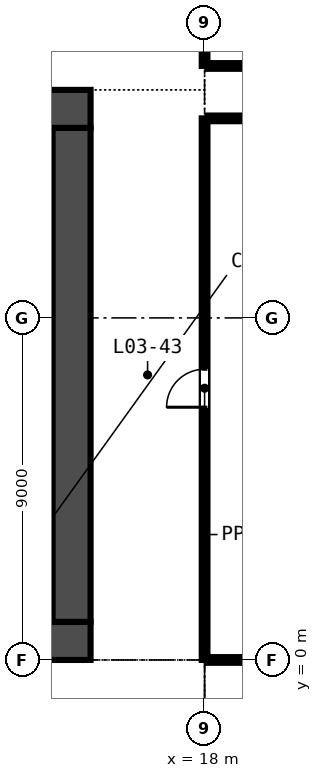
"""IFC4 building model, lengths in metres.
Left out: names, types, materials, properties, quantities, classifications, styles, units other than length and angle.
Written with IfcOpenShell. Run it as: python <this file> out.ifc"""

import sys

from ifc_helpers import new_model, si_unit, direction, frame, frame_2d, origin, place, context, subcontext, project, spatial, rectangle, extrude, element, fill, save


model = new_model("IFC4")
c1 = context("Model", 3, precision=1e-05, world=origin(), true_north=direction((0.0, 1.0)))
c2 = subcontext(c1, "Body", "Model", "MODEL_VIEW")
j1 = project(units=[si_unit("LENGTHUNIT", "METRE"), si_unit("PLANEANGLEUNIT", "RADIAN")], contexts=[c1])
p1 = place(None, origin())
s1 = spatial("IfcSite", under=j1, at=p1, CompositionType="ELEMENT")
p2 = place(p1, origin())
s2 = spatial("IfcBuilding", under=s1, at=p2, CompositionType="ELEMENT")
p3 = place(p2, frame((0.0, 0.0, 22.5)))
s3 = spatial("IfcBuildingStorey", under=s2, at=p3, CompositionType="ELEMENT", Elevation=22.5)
p4 = place(p3, frame((-15.0, 0.5, -0.3), z_axis=(0.0, 0.0, 1.0), x_axis=(1.0, 0.0, 0.0)))
e1 = element("IfcWall", 1, at=p4, inside=s3, PredefinedType="SOLIDWALL", context=c2, shape_type="SweptSolid", body=[
    extrude(rectangle(XDim=30.0, YDim=1.0, at=frame_2d((15.0, 0.0))), origin(), (0.0, 0.0, 1.0), 4.5),
])
p5 = place(p4, frame((5.8, 0.0, 0.3)))
e2 = element("IfcOpeningElement", 2, at=p5, cuts=e1, PredefinedType="OPENING", context=c2, shape_type="SweptSolid", body=[
    extrude(rectangle(XDim=2.4, YDim=2.4, at=frame_2d((1.2, 1.2))), frame((0.0, 0.51, 0.0), z_axis=(0.0, -1.0, 0.0), x_axis=(1.0, 0.0, 0.0)), (0.0, 0.0, 1.0), 1.02),
])
p6 = place(p4, frame((13.8, 0.0, 0.3)))
e3 = element("IfcOpeningElement", 3, at=p6, cuts=e1, PredefinedType="OPENING", context=c2, shape_type="SweptSolid", body=[
    extrude(rectangle(XDim=2.4, YDim=2.4, at=frame_2d((1.2, 1.2))), frame((0.0, 0.51, 0.0), z_axis=(0.0, -1.0, 0.0), x_axis=(1.0, 0.0, 0.0)), (0.0, 0.0, 1.0), 1.02),
])
p7 = place(p4, frame((21.8, 0.0, 0.3)))
e4 = element("IfcOpeningElement", 4, at=p7, cuts=e1, PredefinedType="OPENING", context=c2, shape_type="SweptSolid", body=[
    extrude(rectangle(XDim=2.4, YDim=2.4, at=frame_2d((1.2, 1.2))), frame((0.0, 0.51, 0.0), z_axis=(0.0, -1.0, 0.0), x_axis=(1.0, 0.0, 0.0)), (0.0, 0.0, 1.0), 1.02),
])
p8 = place(p4, frame((1.5, 0.0, 0.3)))
e5 = element("IfcOpeningElement", 5, at=p8, cuts=e1, PredefinedType="OPENING", context=c2, shape_type="SweptSolid", body=[
    extrude(rectangle(XDim=1.2, YDim=2.1, at=frame_2d((0.6, 1.05))), frame((0.0, 0.51, 0.0), z_axis=(0.0, -1.0, 0.0), x_axis=(1.0, 0.0, 0.0)), (0.0, 0.0, 1.0), 1.02),
])
p9 = place(p4, frame((27.3, 0.0, 0.3)))
e6 = element("IfcOpeningElement", 6, at=p9, cuts=e1, PredefinedType="OPENING", context=c2, shape_type="SweptSolid", body=[
    extrude(rectangle(XDim=1.2, YDim=2.1, at=frame_2d((0.6, 1.05))), frame((0.0, 0.51, 0.0), z_axis=(0.0, -1.0, 0.0), x_axis=(1.0, 0.0, 0.0)), (0.0, 0.0, 1.0), 1.02),
])
p10 = place(p3, frame((-15.0, 14.5, -0.3), z_axis=(0.0, 0.0, 1.0), x_axis=(1.0, 0.0, 0.0)))
e7 = element("IfcWall", 7, at=p10, inside=s3, PredefinedType="SOLIDWALL", context=c2, shape_type="SweptSolid", body=[
    extrude(rectangle(XDim=30.0, YDim=1.0, at=frame_2d((15.0, 0.0))), origin(), (0.0, 0.0, 1.0), 4.5),
])
p11 = place(p10, frame((9.25, 0.0, 0.3)))
e8 = element("IfcOpeningElement", 8, at=p11, cuts=e7, PredefinedType="OPENING", context=c2, shape_type="SweptSolid", body=[
    extrude(rectangle(XDim=1.5, YDim=2.1, at=frame_2d((0.75, 1.05))), frame((0.0, 0.51, 0.0), z_axis=(0.0, -1.0, 0.0), x_axis=(1.0, 0.0, 0.0)), (0.0, 0.0, 1.0), 1.02),
])
p12 = place(p10, frame((19.4, 0.0, 0.3)))
e9 = element("IfcOpeningElement", 9, at=p12, cuts=e7, PredefinedType="OPENING", context=c2, shape_type="SweptSolid", body=[
    extrude(rectangle(XDim=1.5, YDim=2.1, at=frame_2d((0.75, 1.05))), frame((0.0, 0.51, 0.0), z_axis=(0.0, -1.0, 0.0), x_axis=(1.0, 0.0, 0.0)), (0.0, 0.0, 1.0), 1.02),
])
p13 = place(p10, frame((1.5, 0.0, 0.3)))
e10 = element("IfcOpeningElement", 10, at=p13, cuts=e7, PredefinedType="OPENING", context=c2, shape_type="SweptSolid", body=[
    extrude(rectangle(XDim=1.2, YDim=2.1, at=frame_2d((0.6, 1.05))), frame((0.0, 0.51, 0.0), z_axis=(0.0, -1.0, 0.0), x_axis=(1.0, 0.0, 0.0)), (0.0, 0.0, 1.0), 1.02),
])
p14 = place(p10, frame((27.3, 0.0, 0.3)))
e11 = element("IfcOpeningElement", 11, at=p14, cuts=e7, PredefinedType="OPENING", context=c2, shape_type="SweptSolid", body=[
    extrude(rectangle(XDim=1.2, YDim=2.1, at=frame_2d((0.6, 1.05))), frame((0.0, 0.51, 0.0), z_axis=(0.0, -1.0, 0.0), x_axis=(1.0, 0.0, 0.0)), (0.0, 0.0, 1.0), 1.02),
])
p15 = place(p3, frame((14.5, 1.0, -0.3), z_axis=(0.0, 0.0, 1.0), x_axis=(0.0, 1.0, 0.0)))
e12 = element("IfcWall", 12, at=p15, inside=s3, PredefinedType="SOLIDWALL", context=c2, shape_type="SweptSolid", body=[
    extrude(rectangle(XDim=13.0, YDim=1.0, at=frame_2d((6.5, 0.0))), origin(), (0.0, 0.0, 1.0), 4.5),
])
p16 = place(p3, frame((11.05, 7.35, -0.3), z_axis=(0.0, 0.0, 1.0), x_axis=(1.0, 0.0, 0.0)))
e13 = element("IfcWall", 13, at=p16, inside=s3, PredefinedType="SOLIDWALL", context=c2, shape_type="SweptSolid", body=[
    extrude(rectangle(XDim=2.95, YDim=0.3, at=frame_2d((1.475, 0.0))), origin(), (0.0, 0.0, 1.0), 4.5),
])
p17 = place(p3, frame((18.075, 0.0, 0.0), z_axis=(0.0, 0.0, 1.0), x_axis=(1.0, 0.0, 0.0)))
e14 = element("IfcWall", 14, at=p17, inside=s3, PredefinedType="PARTITIONING", context=c2, shape_type="SweptSolid", body=[
    extrude(rectangle(XDim=17.865, YDim=0.15, at=frame_2d((8.933, 0.0))), origin(), (0.0, 0.0, 1.0), 4.2),
])
p18 = place(p17, frame((14.325, 0.0, 0.0)))
e15 = element("IfcOpeningElement", 15, at=p18, cuts=e14, PredefinedType="OPENING", context=c2, shape_type="SweptSolid", body=[
    extrude(rectangle(XDim=1.0, YDim=2.1, at=frame_2d((0.5, 1.05))), frame((0.0, 0.085, 0.0), z_axis=(0.0, -1.0, 0.0), x_axis=(1.0, 0.0, 0.0)), (0.0, 0.0, 1.0), 0.17),
])
p19 = place(p3, frame((18.075, 14.25, 0.0), z_axis=(0.0, 0.0, 1.0), x_axis=(1.0, 0.0, 0.0)))
e16 = element("IfcWall", 16, at=p19, inside=s3, PredefinedType="PARTITIONING", context=c2, shape_type="SweptSolid", body=[
    extrude(rectangle(XDim=5.175, YDim=0.15, at=frame_2d((2.587, 0.0))), origin(), (0.0, 0.0, 1.0), 4.2),
])
p20 = place(p3, frame((18.075, 15.629, 0.0), z_axis=(0.0, 0.0, 1.0), x_axis=(1.0, 0.0, 0.0)))
e17 = element("IfcWall", 17, at=p20, inside=s3, PredefinedType="PARTITIONING", context=c2, shape_type="SweptSolid", body=[
    extrude(rectangle(XDim=7.482, YDim=0.15, at=frame_2d((3.741, 0.0))), origin(), (0.0, 0.0, 1.0), 4.2),
])
p21 = place(p3, frame((18.0, 0.0, 0.0), z_axis=(0.0, 0.0, 1.0), x_axis=(0.0, 1.0, 0.0)))
e18 = element("IfcWall", 18, at=p21, inside=s3, PredefinedType="PARTITIONING", context=c2, shape_type="SweptSolid", body=[
    extrude(rectangle(XDim=14.25, YDim=0.15, at=frame_2d((7.125, 0.0))), origin(), (0.0, 0.0, 1.0), 4.2),
])
p22 = place(p21, frame((6.65, 0.0, 0.0)))
e19 = element("IfcOpeningElement", 19, at=p22, cuts=e18, PredefinedType="OPENING", context=c2, shape_type="SweptSolid", body=[
    extrude(rectangle(XDim=1.0, YDim=2.1, at=frame_2d((0.5, 1.05))), frame((0.0, 0.085, 0.0), z_axis=(0.0, -1.0, 0.0), x_axis=(1.0, 0.0, 0.0)), (0.0, 0.0, 1.0), 0.17),
])
p23 = place(p3, frame((18.0, 15.629, 0.0), z_axis=(0.0, 0.0, 1.0), x_axis=(0.0, 1.0, 0.0)))
e20 = element("IfcWall", 20, at=p23, inside=s3, PredefinedType="PARTITIONING", context=c2, shape_type="SweptSolid", body=[
    extrude(rectangle(XDim=9.85, YDim=0.15, at=frame_2d((4.925, 0.0))), origin(), (0.0, 0.0, 1.0), 4.2),
])
p24 = place(p22, origin())
e21 = element("IfcDoor", 21, at=p24, inside=s3, OperationType="SINGLE_SWING_LEFT", PredefinedType="DOOR", context=c2, shape_type="SweptSolid", body=[
    extrude(rectangle(XDim=1.0, YDim=2.1, at=frame_2d((0.5, 1.05))), frame((0.0, 0.025, 0.0), z_axis=(0.0, -1.0, 0.0), x_axis=(1.0, 0.0, 0.0)), (0.0, 0.0, 1.0), 0.05),
])
fill(e19, e21)
save(model, sys.argv[1])
